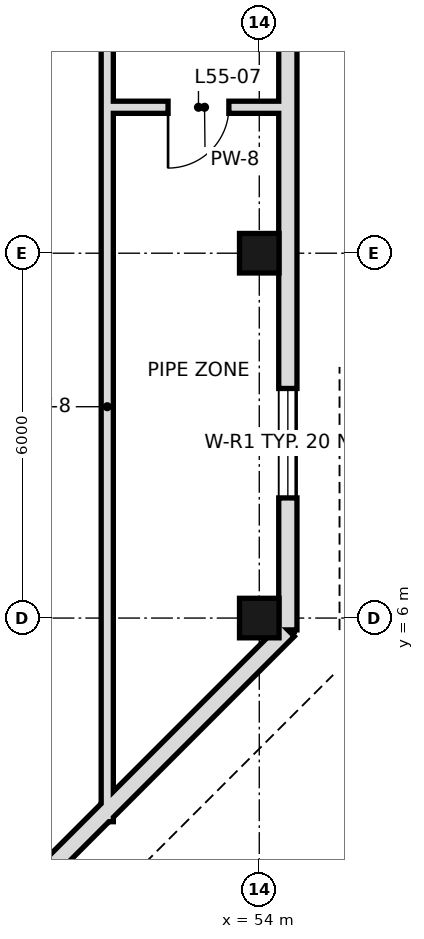
"""IFC4 building model, lengths in metres.
Left out: names, types, materials, properties, quantities, classifications, styles, units other than length and angle.
Written with IfcOpenShell. Run it as: python <this file> out.ifc"""

import sys

from ifc_helpers import new_model, si_unit, direction, frame, frame_2d, origin, origin_2d, place, context, subcontext, project, spatial, rectangle, hollow_rectangle, extrude, element, fill, save


model = new_model("IFC4")
c1 = context("Model", 3, precision=1e-05, world=origin(), true_north=direction((0.0, 1.0)))
c2 = subcontext(c1, "Body", "Model", "MODEL_VIEW")
j1 = project(units=[si_unit("LENGTHUNIT", "METRE"), si_unit("PLANEANGLEUNIT", "RADIAN")], contexts=[c1])
p1 = place(None, origin())
s1 = spatial("IfcSite", under=j1, at=p1, CompositionType="ELEMENT")
p2 = place(p1, origin())
s2 = spatial("IfcBuilding", under=s1, at=p2, CompositionType="ELEMENT")
p3 = place(p2, frame((0.0, 0.0, 234.2)))
s3 = spatial("IfcBuildingStorey", under=s2, at=p3, CompositionType="ELEMENT", Elevation=234.2)
for number, where, z_axis, x_axis in (
    (1, (54.0, 6.0, 0.0), (0.0, 0.0, 1.0), (1.0, 0.0, 0.0)),
    (2, (54.0, 12.0, 0.0), (0.0, 0.0, 1.0), (1.0, 0.0, 0.0)),
):
    element("IfcColumn", number, at=place(p3, frame(where, z_axis=z_axis, x_axis=x_axis)), inside=s3, PredefinedType="COLUMN", context=c2, shape_type="SweptSolid", body=[
        extrude(hollow_rectangle(XDim=0.65, YDim=0.65, WallThickness=0.032, at=origin_2d()), origin(), (0.0, 0.0, 1.0), 5.4),
    ])
p4 = place(p3, frame((48.195, -0.47, 0.0), z_axis=(0.0, 0.0, 1.0), x_axis=(0.707106781187, 0.707106781187, 0.0)))
e3 = element("IfcWall", 3, at=p4, inside=s3, PredefinedType="SOLIDWALL", context=c2, shape_type="SweptSolid", body=[
    extrude(rectangle(XDim=8.875, YDim=0.3, at=frame_2d((4.438, 0.0))), origin(), (0.0, 0.0, 1.0), 5.22),
])
p5 = place(p4, frame((1.292, 0.0, 0.9)))
e4 = element("IfcOpeningElement", 4, at=p5, cuts=e3, PredefinedType="OPENING", context=c2, shape_type="SweptSolid", body=[
    extrude(rectangle(XDim=1.8, YDim=1.5, at=frame_2d((0.9, 0.75))), frame((0.0, 0.16, 0.0), z_axis=(0.0, -1.0, 0.0), x_axis=(1.0, 0.0, 0.0)), (0.0, 0.0, 1.0), 0.32),
])
p6 = place(p3, frame((54.47, 5.805, 0.0), z_axis=(0.0, 0.0, 1.0), x_axis=(0.0, 1.0, 0.0)))
e5 = element("IfcWall", 5, at=p6, inside=s3, PredefinedType="SOLIDWALL", context=c2, shape_type="SweptSolid", body=[
    extrude(rectangle(XDim=36.389, YDim=0.3, at=frame_2d((18.195, 0.0))), origin(), (0.0, 0.0, 1.0), 5.22),
])
p7 = place(p6, frame((2.17, 0.0, 0.9)))
e6 = element("IfcOpeningElement", 6, at=p7, cuts=e5, PredefinedType="OPENING", context=c2, shape_type="SweptSolid", body=[
    extrude(rectangle(XDim=1.8, YDim=1.5, at=frame_2d((0.9, 0.75))), frame((0.0, 0.16, 0.0), z_axis=(0.0, -1.0, 0.0), x_axis=(1.0, 0.0, 0.0)), (0.0, 0.0, 1.0), 0.32),
])
p8 = place(p6, frame((14.295, 0.0, 0.9)))
e7 = element("IfcOpeningElement", 7, at=p8, cuts=e5, PredefinedType="OPENING", context=c2, shape_type="SweptSolid", body=[
    extrude(rectangle(XDim=1.8, YDim=1.5, at=frame_2d((0.9, 0.75))), frame((0.0, 0.16, 0.0), z_axis=(0.0, -1.0, 0.0), x_axis=(1.0, 0.0, 0.0)), (0.0, 0.0, 1.0), 0.32),
])
p9 = place(p6, frame((26.295, 0.0, 0.9)))
e8 = element("IfcOpeningElement", 8, at=p9, cuts=e5, PredefinedType="OPENING", context=c2, shape_type="SweptSolid", body=[
    extrude(rectangle(XDim=1.8, YDim=1.5, at=frame_2d((0.9, 0.75))), frame((0.0, 0.16, 0.0), z_axis=(0.0, -1.0, 0.0), x_axis=(1.0, 0.0, 0.0)), (0.0, 0.0, 1.0), 0.32),
])
p10 = place(p3, frame((51.5, 2.651, 0.0), z_axis=(0.0, 0.0, 1.0), x_axis=(0.0, 1.0, 0.0)))
e9 = element("IfcWall", 9, at=p10, inside=s3, PredefinedType="SOLIDWALL", context=c2, shape_type="SweptSolid", body=[
    extrude(rectangle(XDim=13.649, YDim=0.2, at=frame_2d((6.825, 0.0))), origin(), (0.0, 0.0, 1.0), 4.77),
])
p11 = place(p3, frame((51.6, 14.4, 0.0), z_axis=(0.0, 0.0, 1.0), x_axis=(1.0, 0.0, 0.0)))
e10 = element("IfcWall", 10, at=p11, inside=s3, PredefinedType="SOLIDWALL", context=c2, shape_type="SweptSolid", body=[
    extrude(rectangle(XDim=3.0, YDim=0.2, at=frame_2d((1.5, 0.0))), origin(), (0.0, 0.0, 1.0), 4.52),
])
p12 = place(p11, frame((0.9, 0.0, 0.0)))
e11 = element("IfcOpeningElement", 11, at=p12, cuts=e10, PredefinedType="OPENING", context=c2, shape_type="SweptSolid", body=[
    extrude(rectangle(XDim=1.0, YDim=2.4, at=frame_2d((0.5, 1.2))), frame((0.0, 0.11, 0.0), z_axis=(0.0, -1.0, 0.0), x_axis=(1.0, 0.0, 0.0)), (0.0, 0.0, 1.0), 0.22),
])
p13 = place(p7, origin())
e12 = element("IfcWindow", 12, at=p13, inside=s3, PartitioningType="SINGLE_PANEL", PredefinedType="WINDOW", context=c2, shape_type="SweptSolid", body=[
    extrude(rectangle(XDim=1.8, YDim=1.5, at=frame_2d((0.9, 0.75))), frame((0.0, 0.03, 0.0), z_axis=(0.0, -1.0, 0.0), x_axis=(1.0, 0.0, 0.0)), (0.0, 0.0, 1.0), 0.06),
])
fill(e6, e12)
p14 = place(p12, frame((1.0, 0.0, 0.0), z_axis=(0.0, 0.0, 1.0), x_axis=(-1.0, 0.0, 0.0)))
e13 = element("IfcDoor", 13, at=p14, inside=s3, OperationType="SINGLE_SWING_RIGHT", PredefinedType="DOOR", context=c2, shape_type="SweptSolid", body=[
    extrude(rectangle(XDim=1.0, YDim=2.4, at=frame_2d((0.5, 1.2))), frame((0.0, 0.025, 0.0), z_axis=(0.0, -1.0, 0.0), x_axis=(1.0, 0.0, 0.0)), (0.0, 0.0, 1.0), 0.05),
])
fill(e11, e13)
save(model, sys.argv[1])
